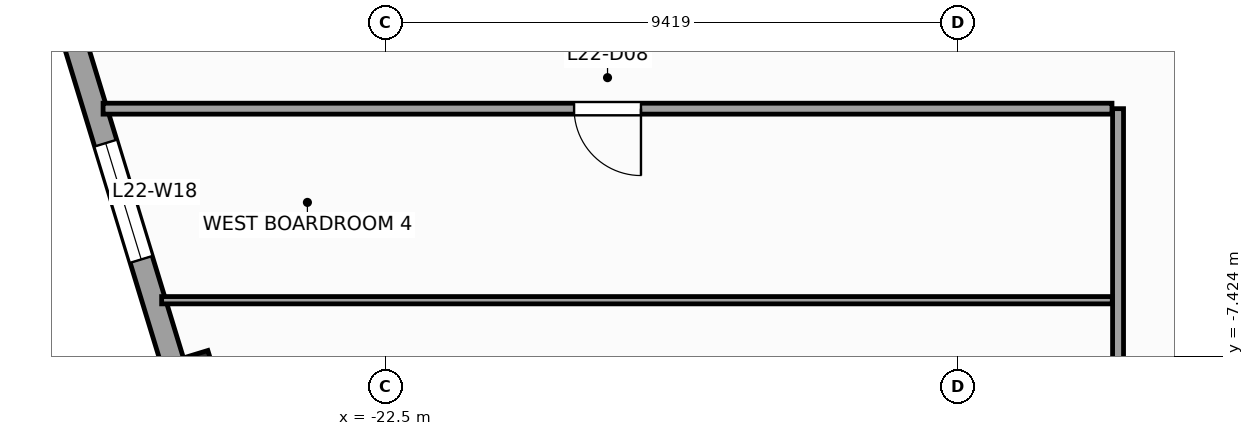
"""IFC4 building model, lengths in metres.
Left out: names, types, materials, properties, quantities, classifications, styles, units other than length and angle.
Written with IfcOpenShell. Run it as: python <this file> out.ifc"""

import sys

from ifc_helpers import new_model, si_unit, direction, frame, frame_2d, origin, origin_2d, place, context, subcontext, project, spatial, rectangle, extrude, source, transform, mapped, element, fill, save


model = new_model("IFC4")
c1 = context("Model", 3, precision=1e-05, world=origin(), true_north=direction((0.0, 1.0)))
c2 = subcontext(c1, "Body", "Model", "MODEL_VIEW")
j1 = project(units=[si_unit("LENGTHUNIT", "METRE"), si_unit("PLANEANGLEUNIT", "RADIAN")], contexts=[c1])
p1 = place(None, origin())
s1 = spatial("IfcSite", under=j1, at=p1, CompositionType="ELEMENT")
p2 = place(p1, origin())
s2 = spatial("IfcBuilding", under=s1, at=p2, CompositionType="ELEMENT")
p3 = place(p2, frame((0.0, 0.0, 95.2)))
s3 = spatial("IfcBuildingStorey", under=s2, at=p3, CompositionType="ELEMENT", Elevation=95.2)
m1 = source(origin(), c2, "Body", "SweptSolid", [
    extrude(rectangle(XDim=0.75, YDim=0.85, at=origin_2d()), origin(), (0.0, 0.0, 1.0), 4.0),
])
p4 = place(p3, frame((-25.653, -7.843, 0.0), z_axis=(0.0, 0.0, 1.0), x_axis=(0.956304755963, 0.292371704723, 0.0)))
e1 = element("IfcColumn", 1, at=p4, inside=s3, PredefinedType="COLUMN", context=c2, shape_type="MappedRepresentation", body=[
    mapped(m1, transform((0.0, 0.0, 0.0), scale=1.0)),
])
p5 = place(p3, frame((-32.658, 14.265, 0.0), z_axis=(0.0, 0.0, 1.0), x_axis=(0.292373127906, -0.956304320851, 0.0)))
e2 = element("IfcWall", 2, at=p5, inside=s3, PredefinedType="STANDARD", context=c2, shape_type="SweptSolid", body=[
    extrude(rectangle(XDim=46.38, YDim=0.38, at=frame_2d((23.19, 0.0))), origin(), (0.0, 0.0, 1.0), 3.14),
])
p6 = place(p5, frame((28.265, 0.0, 0.0)))
e3 = element("IfcOpeningElement", 3, at=p6, cuts=e2, PredefinedType="OPENING", context=c2, shape_type="SweptSolid", body=[
    extrude(rectangle(XDim=1.05, YDim=2.25, at=frame_2d((0.525, 1.125))), frame((0.0, 0.2, 0.0), z_axis=(0.0, -1.0, 0.0), x_axis=(1.0, 0.0, 0.0)), (0.0, 0.0, 1.0), 0.4),
])
p7 = place(p5, frame((4.865, 0.0, 0.51)))
e4 = element("IfcOpeningElement", 4, at=p7, cuts=e2, PredefinedType="OPENING", context=c2, shape_type="SweptSolid", body=[
    extrude(rectangle(XDim=1.4, YDim=2.4, at=frame_2d((0.7, 1.2))), frame((0.0, 0.2, 0.0), z_axis=(0.0, -1.0, 0.0), x_axis=(1.0, 0.0, 0.0)), (0.0, 0.0, 1.0), 0.4),
])
p8 = place(p5, frame((12.45, 0.0, 0.51)))
e5 = element("IfcOpeningElement", 5, at=p8, cuts=e2, PredefinedType="OPENING", context=c2, shape_type="SweptSolid", body=[
    extrude(rectangle(XDim=2.0, YDim=2.4, at=frame_2d((1.0, 1.2))), frame((0.0, 0.2, 0.0), z_axis=(0.0, -1.0, 0.0), x_axis=(1.0, 0.0, 0.0)), (0.0, 0.0, 1.0), 0.4),
])
p9 = place(p5, frame((19.012, 0.0, 0.51)))
e6 = element("IfcOpeningElement", 6, at=p9, cuts=e2, PredefinedType="OPENING", context=c2, shape_type="SweptSolid", body=[
    extrude(rectangle(XDim=2.0, YDim=2.4, at=frame_2d((1.0, 1.2))), frame((0.0, 0.2, 0.0), z_axis=(0.0, -1.0, 0.0), x_axis=(1.0, 0.0, 0.0)), (0.0, 0.0, 1.0), 0.4),
])
p10 = place(p5, frame((30.538, 0.0, 0.51)))
e7 = element("IfcOpeningElement", 7, at=p10, cuts=e2, PredefinedType="OPENING", context=c2, shape_type="SweptSolid", body=[
    extrude(rectangle(XDim=2.0, YDim=2.4, at=frame_2d((1.0, 1.2))), frame((0.0, 0.2, 0.0), z_axis=(0.0, -1.0, 0.0), x_axis=(1.0, 0.0, 0.0)), (0.0, 0.0, 1.0), 0.4),
])
p11 = place(p5, frame((39.187, 0.0, 0.51)))
e8 = element("IfcOpeningElement", 8, at=p11, cuts=e2, PredefinedType="OPENING", context=c2, shape_type="SweptSolid", body=[
    extrude(rectangle(XDim=1.4, YDim=2.4, at=frame_2d((0.7, 1.2))), frame((0.0, 0.2, 0.0), z_axis=(0.0, -1.0, 0.0), x_axis=(1.0, 0.0, 0.0)), (0.0, 0.0, 1.0), 0.4),
])
p12 = place(p3, frame((-10.45, -10.45, 0.0), z_axis=(0.0, 0.0, 1.0), x_axis=(0.0, 1.0, 0.0)))
e9 = element("IfcWall", 9, at=p12, inside=s3, PredefinedType="PARTITIONING", context=c2, shape_type="SweptSolid", body=[
    extrude(rectangle(XDim=7.1, YDim=0.18, at=frame_2d((3.55, 0.0))), origin(), (0.0, 0.0, 1.0), 3.74),
])
p13 = place(p3, frame((-27.142, -3.35, 0.0), z_axis=(0.0, 0.0, 1.0), x_axis=(1.0, 0.0, 0.0)))
e10 = element("IfcWall", 10, at=p13, inside=s3, PredefinedType="PARTITIONING", context=c2, shape_type="SweptSolid", body=[
    extrude(rectangle(XDim=16.592, YDim=0.18, at=frame_2d((8.296, 0.0))), origin(), (0.0, 0.0, 1.0), 3.74),
])
p14 = place(p13, frame((7.746, 0.0, 0.0)))
e11 = element("IfcOpeningElement", 11, at=p14, cuts=e10, PredefinedType="OPENING", context=c2, shape_type="SweptSolid", body=[
    extrude(rectangle(XDim=1.1, YDim=2.2, at=frame_2d((0.55, 1.1))), frame((0.0, 0.1, 0.0), z_axis=(0.0, -1.0, 0.0), x_axis=(1.0, 0.0, 0.0)), (0.0, 0.0, 1.0), 0.2),
])
p15 = place(p3, frame((-26.178, -6.5, 0.0), z_axis=(0.0, 0.0, 1.0), x_axis=(1.0, 0.0, 0.0)))
e12 = element("IfcWall", 12, at=p15, inside=s3, PredefinedType="PARTITIONING", context=c2, shape_type="SweptSolid", body=[
    extrude(rectangle(XDim=15.634, YDim=0.12, at=frame_2d((7.817, 0.0))), origin(), (0.0, 0.0, 1.0), 3.74),
])
m2 = source(origin(), c2, "Body", "SweptSolid", [
    extrude(rectangle(XDim=2.0, YDim=2.4, at=frame_2d((1.0, 1.2))), frame((0.0, 0.03, 0.0), z_axis=(0.0, -1.0, 0.0), x_axis=(1.0, 0.0, 0.0)), (0.0, 0.0, 1.0), 0.06),
])
p16 = place(p9, origin())
e13 = element("IfcWindow", 13, at=p16, inside=s3, PartitioningType="SINGLE_PANEL", PredefinedType="WINDOW", context=c2, shape_type="MappedRepresentation", body=[
    mapped(m2, transform((0.0, 0.0, 0.0), scale=1.0)),
])
fill(e6, e13)
m3 = source(origin(), c2, "Body", "SweptSolid", [
    extrude(rectangle(XDim=1.1, YDim=2.2, at=frame_2d((0.55, 1.1))), frame((0.0, 0.025, 0.0), z_axis=(0.0, -1.0, 0.0), x_axis=(1.0, 0.0, 0.0)), (0.0, 0.0, 1.0), 0.05),
])
p17 = place(p14, frame((1.1, 0.0, 0.0), z_axis=(0.0, 0.0, 1.0), x_axis=(-1.0, 0.0, 0.0)))
e14 = element("IfcDoor", 14, at=p17, inside=s3, OperationType="SINGLE_SWING_RIGHT", PredefinedType="DOOR", context=c2, shape_type="MappedRepresentation", body=[
    mapped(m3, transform((0.0, 0.0, 0.0), scale=1.0)),
])
fill(e11, e14)
save(model, sys.argv[1])
